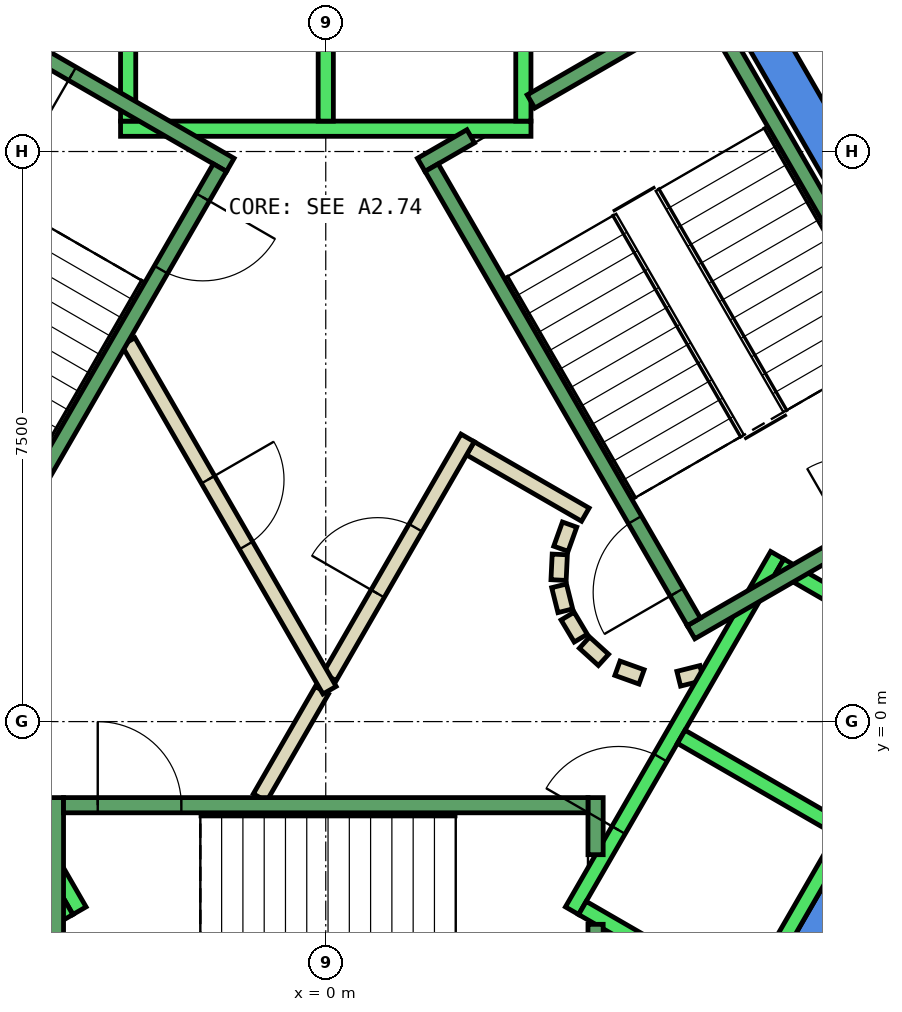
"""IFC4 building model, lengths in metres.
Left out: names, types, materials, properties, quantities, classifications, styles, units other than length and angle.
Written with IfcOpenShell. Run it as: python <this file> out.ifc"""

import sys

from ifc_helpers import new_model, si_unit, direction, frame, frame_2d, origin, place, context, subcontext, project, spatial, polyline, rectangle, outline, extrude, element, fill, save


model = new_model("IFC4")
c1 = context("Model", 3, precision=1e-05, world=origin(), true_north=direction((0.0, 1.0)))
c2 = subcontext(c1, "Body", "Model", "MODEL_VIEW")
j1 = project(units=[si_unit("LENGTHUNIT", "METRE"), si_unit("PLANEANGLEUNIT", "RADIAN")], contexts=[c1])
p1 = place(None, origin())
s1 = spatial("IfcSite", under=j1, at=p1, CompositionType="ELEMENT")
p2 = place(p1, origin())
s2 = spatial("IfcBuilding", under=s1, at=p2, CompositionType="ELEMENT")
p3 = place(p2, frame((0.0, 0.0, 349.4)))
s3 = spatial("IfcBuildingStorey", under=s2, at=p3, CompositionType="ELEMENT", Elevation=349.4)
p4 = place(p3, frame((0.0, 0.0, -0.45)))
e1 = element("IfcWall", 1, at=p4, inside=s3, PredefinedType="SHEAR", context=c2, shape_type="SweptSolid", body=[
    extrude(outline(polyline([(5.486, 9.998), (5.053, 9.748), (9.238, 2.5), (9.815, 2.5), (5.486, 9.998)])), origin(), (0.0, 0.0, 1.0), 4.6),
])
p5 = place(p3, frame((0.0, 0.0, -0.45)))
e2 = element("IfcWall", 2, at=p5, inside=s3, PredefinedType="SHEAR", context=c2, shape_type="SweptSolid", body=[
    extrude(outline(polyline([(4.907, -6.0), (9.815, 2.5), (9.238, 2.5), (4.619, -5.5), (4.907, -6.0)])), origin(), (0.0, 0.0, 1.0), 4.6),
])
p6 = place(p3, frame((-0.866, -1.0, 0.0), z_axis=(0.0, 0.0, 1.0), x_axis=(0.500033287521, 0.866006184372, 0.0)))
e3 = element("IfcWall", 3, at=p6, inside=s3, PredefinedType="PARTITIONING", context=c2, shape_type="SweptSolid", body=[
    extrude(rectangle(XDim=1.632, YDim=0.2, at=frame_2d((0.816, 0.0))), origin(), (0.0, 0.0, 1.0), 4.15),
])
p7 = place(p3, frame((1.903, 3.595, 0.0), z_axis=(0.0, 0.0, 1.0), x_axis=(0.866239139897, -0.499629615326, 0.0)))
e4 = element("IfcWall", 4, at=p7, inside=s3, PredefinedType="PARTITIONING", context=c2, shape_type="SweptSolid", body=[
    extrude(rectangle(XDim=1.745, YDim=0.2, at=frame_2d((0.873, 0.0))), origin(), (0.0, 0.0, 1.0), 4.15),
])
p8 = place(p3, frame((3.208, 2.592, 0.0), z_axis=(0.0, 0.0, 1.0), x_axis=(-0.337388820924, -0.941365382578, 0.0)))
e5 = element("IfcWall", 5, at=p8, inside=s3, PredefinedType="PARTITIONING", context=c2, shape_type="SweptSolid", body=[
    extrude(rectangle(XDim=0.338, YDim=0.2, at=frame_2d((0.169, 0.0))), origin(), (0.0, 0.0, 1.0), 4.15),
])
p9 = place(p3, frame((3.079, 2.199, 0.0), z_axis=(0.0, 0.0, 1.0), x_axis=(-0.047771483479, -0.998858290933, 0.0)))
e6 = element("IfcWall", 6, at=p9, inside=s3, PredefinedType="PARTITIONING", context=c2, shape_type="SweptSolid", body=[
    extrude(rectangle(XDim=0.337, YDim=0.2, at=frame_2d((0.169, 0.0))), origin(), (0.0, 0.0, 1.0), 4.15),
])
p10 = place(p3, frame((3.07, 1.786, 0.0), z_axis=(0.0, 0.0, 1.0), x_axis=(0.242705583207, -0.970099994784, 0.0)))
e7 = element("IfcWall", 7, at=p10, inside=s3, PredefinedType="PARTITIONING", context=c2, shape_type="SweptSolid", body=[
    extrude(rectangle(XDim=0.338, YDim=0.2, at=frame_2d((0.169, 0.0))), origin(), (0.0, 0.0, 1.0), 4.15),
])
for number, where, z_axis, x_axis in (
    (8, (3.182, 1.388, 0.0), (0.0, 0.0, 1.0), (0.512, -0.859, 0.0)),
    (9, (3.404, 1.039, 0.0), (0.0, 0.0, 1.0), (0.74, -0.672, 0.0)),
):
    element("IfcWall", number, at=place(p3, frame(where, z_axis=z_axis, x_axis=x_axis)), inside=s3, PredefinedType="PARTITIONING", context=c2, shape_type="SweptSolid", body=[
        extrude(rectangle(XDim=0.338, YDim=0.2, at=frame_2d((0.169, 0.0))), origin(), (0.0, 0.0, 1.0), 4.15),
    ])
p11 = place(p3, frame((3.838, 0.702, 0.0), z_axis=(0.0, 0.0, 1.0), x_axis=(0.941035081519, -0.338308993895, 0.0)))
e10 = element("IfcWall", 10, at=p11, inside=s3, PredefinedType="PARTITIONING", context=c2, shape_type="SweptSolid", body=[
    extrude(rectangle(XDim=0.337, YDim=0.2, at=frame_2d((0.168, 0.0))), origin(), (0.0, 0.0, 1.0), 4.15),
])
p12 = place(p3, frame((4.644, 0.564, 0.0), z_axis=(0.0, 0.0, 1.0), x_axis=(0.970004408322, 0.243087325534, 0.0)))
e11 = element("IfcWall", 11, at=p12, inside=s3, PredefinedType="PARTITIONING", context=c2, shape_type="SweptSolid", body=[
    extrude(rectangle(XDim=0.312, YDim=0.2, at=frame_2d((0.156, 0.0))), origin(), (0.0, 0.0, 1.0), 4.15),
])
p13 = place(p3, frame((0.05, 0.587, 0.0), z_axis=(0.0, 0.0, 1.0), x_axis=(0.500028932171, 0.866008699143, 0.0)))
e12 = element("IfcWall", 12, at=p13, inside=s3, PredefinedType="PARTITIONING", context=c2, shape_type="SweptSolid", body=[
    extrude(rectangle(XDim=3.632, YDim=0.2, at=frame_2d((1.816, 0.0))), origin(), (0.0, 0.0, 1.0), 4.15),
])
p14 = place(p13, frame((1.266, 0.0, 0.0)))
e13 = element("IfcOpeningElement", 13, at=p14, cuts=e12, PredefinedType="OPENING", context=c2, shape_type="SweptSolid", body=[
    extrude(rectangle(XDim=1.0, YDim=2.1, at=frame_2d((0.5, 1.05))), frame((0.0, 0.11, 0.0), z_axis=(0.0, -1.0, 0.0), x_axis=(1.0, 0.0, 0.0)), (0.0, 0.0, 1.0), 0.22),
])
p15 = place(p3, frame((-2.598, 5.0, 0.0), z_axis=(0.0, 0.0, 1.0), x_axis=(0.49995654735, -0.86605048973, 0.0)))
e14 = element("IfcWall", 14, at=p15, inside=s3, PredefinedType="PARTITIONING", context=c2, shape_type="SweptSolid", body=[
    extrude(rectangle(XDim=5.296, YDim=0.2, at=frame_2d((2.648, 0.0))), origin(), (0.0, 0.0, 1.0), 4.15),
])
p16 = place(p15, frame((2.098, 0.0, 0.0)))
e15 = element("IfcOpeningElement", 15, at=p16, cuts=e14, PredefinedType="OPENING", context=c2, shape_type="SweptSolid", body=[
    extrude(rectangle(XDim=1.0, YDim=2.1, at=frame_2d((0.5, 1.05))), frame((0.0, 0.11, 0.0), z_axis=(0.0, -1.0, 0.0), x_axis=(1.0, 0.0, 0.0)), (0.0, 0.0, 1.0), 0.22),
])
p17 = place(p3, frame((2.7, 7.8, 0.0), z_axis=(0.0, 0.0, 1.0), x_axis=(-1.0, 0.0, 0.0)))
e16 = element("IfcWall", 16, at=p17, inside=s3, PredefinedType="STANDARD", context=c2, shape_type="SweptSolid", body=[
    extrude(rectangle(XDim=5.4, YDim=0.2, at=frame_2d((2.7, 0.0))), origin(), (0.0, 0.0, 1.0), 4.15),
])
for number, where, z_axis, x_axis in (
    (17, (2.6, 7.9, 0.0), (0.0, 0.0, 1.0), (0.0, 1.0, 0.0)),
    (18, (0.0, 7.9, 0.0), (0.0, 0.0, 1.0), (0.0, 1.0, 0.0)),
    (19, (-2.6, 7.9, 0.0), (0.0, 0.0, 1.0), (0.0, 1.0, 0.0)),
):
    element("IfcWall", number, at=place(p3, frame(where, z_axis=z_axis, x_axis=x_axis)), inside=s3, PredefinedType="STANDARD", context=c2, shape_type="SweptSolid", body=[
        extrude(rectangle(XDim=2.4, YDim=0.2, at=frame_2d((1.2, 0.0))), origin(), (0.0, 0.0, 1.0), 4.15),
    ])
p18 = place(p3, frame((-5.94, 2.188, 0.0), z_axis=(0.0, 0.0, 1.0), x_axis=(0.500034260056, -0.866005622828, 0.0)))
e20 = element("IfcWall", 20, at=p18, inside=s3, PredefinedType="STANDARD", context=c2, shape_type="SweptSolid", body=[
    extrude(rectangle(XDim=5.399, YDim=0.2, at=frame_2d((2.7, 0.0))), origin(), (0.0, 0.0, 1.0), 4.15),
])
p19 = place(p18, frame((1.225, 0.0, 0.0)))
e21 = element("IfcOpeningElement", 21, at=p19, cuts=e20, PredefinedType="OPENING", context=c2, shape_type="SweptSolid", body=[
    extrude(rectangle(XDim=1.1, YDim=2.1, at=frame_2d((0.55, 1.05))), frame((0.0, 0.11, 0.0), z_axis=(0.0, -1.0, 0.0), x_axis=(1.0, 0.0, 0.0)), (0.0, 0.0, 1.0), 0.22),
])
p20 = place(p3, frame((-3.377, -2.452, 0.0), z_axis=(0.0, 0.0, 1.0), x_axis=(-0.865955154139, -0.50012165622, 0.0)))
e22 = element("IfcWall", 22, at=p20, inside=s3, PredefinedType="STANDARD", context=c2, shape_type="SweptSolid", body=[
    extrude(rectangle(XDim=2.4, YDim=0.2, at=frame_2d((1.2, 0.0))), origin(), (0.0, 0.0, 1.0), 4.15),
])
p21 = place(p3, frame((3.24, -2.488, 0.0), z_axis=(0.0, 0.0, 1.0), x_axis=(0.500034260056, 0.866005622828, 0.0)))
e23 = element("IfcWall", 23, at=p21, inside=s3, PredefinedType="STANDARD", context=c2, shape_type="SweptSolid", body=[
    extrude(rectangle(XDim=5.399, YDim=0.2, at=frame_2d((2.7, 0.0))), origin(), (0.0, 0.0, 1.0), 4.15),
])
p22 = place(p21, frame((1.225, 0.0, 0.0)))
e24 = element("IfcOpeningElement", 24, at=p22, cuts=e23, PredefinedType="OPENING", context=c2, shape_type="SweptSolid", body=[
    extrude(rectangle(XDim=1.1, YDim=2.1, at=frame_2d((0.55, 1.05))), frame((0.0, 0.11, 0.0), z_axis=(0.0, -1.0, 0.0), x_axis=(1.0, 0.0, 0.0)), (0.0, 0.0, 1.0), 0.22),
])
p23 = place(p3, frame((5.492, -3.788, 0.0), z_axis=(0.0, 0.0, 1.0), x_axis=(0.500034260056, 0.866005622828, 0.0)))
e25 = element("IfcWall", 25, at=p23, inside=s3, PredefinedType="STANDARD", context=c2, shape_type="SweptSolid", body=[
    extrude(rectangle(XDim=5.399, YDim=0.2, at=frame_2d((2.7, 0.0))), origin(), (0.0, 0.0, 1.0), 4.15),
])
p24 = place(p3, frame((3.377, -2.452, 0.0), z_axis=(0.0, 0.0, 1.0), x_axis=(0.865955154139, -0.50012165622, 0.0)))
e26 = element("IfcWall", 26, at=p24, inside=s3, PredefinedType="STANDARD", context=c2, shape_type="SweptSolid", body=[
    extrude(rectangle(XDim=2.4, YDim=0.2, at=frame_2d((1.2, 0.0))), origin(), (0.0, 0.0, 1.0), 4.15),
])
for number, where, z_axis, x_axis in (
    (27, (4.677, -0.2, 0.0), (0.0, 0.0, 1.0), (0.866, -0.5, 0.0)),
    (28, (5.977, 2.052, 0.0), (0.0, 0.0, 1.0), (0.866, -0.5, 0.0)),
):
    element("IfcWall", number, at=place(p3, frame(where, z_axis=z_axis, x_axis=x_axis)), inside=s3, PredefinedType="STANDARD", context=c2, shape_type="SweptSolid", body=[
        extrude(rectangle(XDim=2.399, YDim=0.2, at=frame_2d((1.2, 0.0))), origin(), (0.0, 0.0, 1.0), 4.15),
    ])
p25 = place(p3, frame((-3.55, -1.0, 0.0), z_axis=(0.0, 0.0, 1.0), x_axis=(0.0, -1.0, 0.0)))
e29 = element("IfcWall", 29, at=p25, inside=s3, PredefinedType="STANDARD", context=c2, shape_type="SweptSolid", body=[
    extrude(rectangle(XDim=4.4, YDim=0.2, at=frame_2d((2.2, 0.0))), origin(), (0.0, 0.0, 1.0), 4.15),
])
p26 = place(p25, frame((2.4, 0.0, 0.0)))
e30 = element("IfcOpeningElement", 30, at=p26, cuts=e29, PredefinedType="OPENING", context=c2, shape_type="SweptSolid", body=[
    extrude(rectangle(XDim=1.1, YDim=2.2, at=frame_2d((0.55, 1.1))), frame((0.0, 0.11, 0.0), z_axis=(0.0, -1.0, 0.0), x_axis=(1.0, 0.0, 0.0)), (0.0, 0.0, 1.0), 0.22),
])
p27 = place(p3, frame((3.55, -2.667, 0.0), z_axis=(0.0, 0.0, 1.0), x_axis=(0.0, -1.0, 0.0)))
e31 = element("IfcWall", 31, at=p27, inside=s3, PredefinedType="STANDARD", context=c2, shape_type="SweptSolid", body=[
    extrude(rectangle(XDim=2.733, YDim=0.2, at=frame_2d((1.366, 0.0))), origin(), (0.0, 0.0, 1.0), 4.15),
])
p28 = place(p3, frame((3.55, -1.0, 0.0), z_axis=(0.0, 0.0, 1.0), x_axis=(0.0, -1.0, 0.0)))
e32 = element("IfcWall", 32, at=p28, inside=s3, PredefinedType="STANDARD", context=c2, shape_type="SweptSolid", body=[
    extrude(rectangle(XDim=0.751, YDim=0.2, at=frame_2d((0.375, 0.0))), origin(), (0.0, 0.0, 1.0), 4.15),
])
p29 = place(p3, frame((-3.45, -1.1, 0.0), z_axis=(0.0, 0.0, 1.0), x_axis=(1.0, 0.0, 0.0)))
e33 = element("IfcWall", 33, at=p29, inside=s3, PredefinedType="STANDARD", context=c2, shape_type="SweptSolid", body=[
    extrude(rectangle(XDim=6.9, YDim=0.2, at=frame_2d((3.45, 0.0))), origin(), (0.0, 0.0, 1.0), 4.15),
])
p30 = place(p29, frame((0.45, 0.0, 0.0)))
e34 = element("IfcOpeningElement", 34, at=p30, cuts=e33, PredefinedType="OPENING", context=c2, shape_type="SweptSolid", body=[
    extrude(rectangle(XDim=1.1, YDim=2.2, at=frame_2d((0.55, 1.1))), frame((0.0, 0.11, 0.0), z_axis=(0.0, -1.0, 0.0), x_axis=(1.0, 0.0, 0.0)), (0.0, 0.0, 1.0), 0.22),
])
p31 = place(p3, frame((4.806, 1.176, 0.0), z_axis=(0.0, 0.0, 1.0), x_axis=(0.866059941101, 0.499940174841, 0.0)))
e35 = element("IfcWall", 35, at=p31, inside=s3, PredefinedType="STANDARD", context=c2, shape_type="SweptSolid", body=[
    extrude(rectangle(XDim=4.4, YDim=0.2, at=frame_2d((2.2, 0.0))), origin(), (0.0, 0.0, 1.0), 4.15),
])
p32 = place(p31, frame((2.4, 0.0, 0.0)))
e36 = element("IfcOpeningElement", 36, at=p32, cuts=e35, PredefinedType="OPENING", context=c2, shape_type="SweptSolid", body=[
    extrude(rectangle(XDim=1.1, YDim=2.2, at=frame_2d((0.55, 1.1))), frame((0.0, 0.11, 0.0), z_axis=(0.0, -1.0, 0.0), x_axis=(1.0, 0.0, 0.0)), (0.0, 0.0, 1.0), 0.22),
])
p33 = place(p3, frame((2.7, 8.158, 0.0), z_axis=(0.0, 0.0, 1.0), x_axis=(0.86611865017, 0.499838457731, 0.0)))
e37 = element("IfcWall", 37, at=p33, inside=s3, PredefinedType="STANDARD", context=c2, shape_type="SweptSolid", body=[
    extrude(rectangle(XDim=2.733, YDim=0.2, at=frame_2d((1.366, 0.0))), origin(), (0.0, 0.0, 1.0), 4.15),
])
p34 = place(p3, frame((1.256, 7.324, 0.0), z_axis=(0.0, 0.0, 1.0), x_axis=(0.865915093549, 0.500191014278, 0.0)))
e38 = element("IfcWall", 38, at=p34, inside=s3, PredefinedType="STANDARD", context=c2, shape_type="SweptSolid", body=[
    extrude(rectangle(XDim=0.752, YDim=0.2, at=frame_2d((0.376, 0.0))), origin(), (0.0, 0.0, 1.0), 4.15),
])
p35 = place(p3, frame((4.843, 1.312, 0.0), z_axis=(0.0, 0.0, 1.0), x_axis=(-0.499963383562, 0.866046543262, 0.0)))
e39 = element("IfcWall", 39, at=p35, inside=s3, PredefinedType="STANDARD", context=c2, shape_type="SweptSolid", body=[
    extrude(rectangle(XDim=6.9, YDim=0.2, at=frame_2d((3.45, 0.0))), origin(), (0.0, 0.0, 1.0), 4.15),
])
p36 = place(p35, frame((0.45, 0.0, 0.0)))
e40 = element("IfcOpeningElement", 40, at=p36, cuts=e39, PredefinedType="OPENING", context=c2, shape_type="SweptSolid", body=[
    extrude(rectangle(XDim=1.1, YDim=2.2, at=frame_2d((0.55, 1.1))), frame((0.0, 0.11, 0.0), z_axis=(0.0, -1.0, 0.0), x_axis=(1.0, 0.0, 0.0)), (0.0, 0.0, 1.0), 0.22),
])
p37 = place(p3, frame((8.48, 3.412, 0.0), z_axis=(0.0, 0.0, 1.0), x_axis=(-0.499978703459, 0.866037698999, 0.0)))
e41 = element("IfcWall", 41, at=p37, inside=s3, PredefinedType="STANDARD", context=c2, shape_type="SweptSolid", body=[
    extrude(rectangle(XDim=6.9, YDim=0.2, at=frame_2d((3.45, 0.0))), origin(), (0.0, 0.0, 1.0), 4.15),
])
p38 = place(p3, frame((-1.256, 7.324, 0.0), z_axis=(0.0, 0.0, 1.0), x_axis=(-0.866046073146, 0.499964197906, 0.0)))
e42 = element("IfcWall", 42, at=p38, inside=s3, PredefinedType="STANDARD", context=c2, shape_type="SweptSolid", body=[
    extrude(rectangle(XDim=4.4, YDim=0.2, at=frame_2d((2.2, 0.0))), origin(), (0.0, 0.0, 1.0), 4.15),
])
p39 = place(p38, frame((2.4, 0.0, 0.0)))
e43 = element("IfcOpeningElement", 43, at=p39, cuts=e42, PredefinedType="OPENING", context=c2, shape_type="SweptSolid", body=[
    extrude(rectangle(XDim=1.1, YDim=2.2, at=frame_2d((0.55, 1.1))), frame((0.0, 0.11, 0.0), z_axis=(0.0, -1.0, 0.0), x_axis=(1.0, 0.0, 0.0)), (0.0, 0.0, 1.0), 0.22),
])
p40 = place(p3, frame((-1.393, 7.288, 0.0), z_axis=(0.0, 0.0, 1.0), x_axis=(-0.499963383562, -0.866046543262, 0.0)))
e44 = element("IfcWall", 44, at=p40, inside=s3, PredefinedType="STANDARD", context=c2, shape_type="SweptSolid", body=[
    extrude(rectangle(XDim=6.9, YDim=0.2, at=frame_2d((3.45, 0.0))), origin(), (0.0, 0.0, 1.0), 4.15),
])
p41 = place(p40, frame((0.45, 0.0, 0.0)))
e45 = element("IfcOpeningElement", 45, at=p41, cuts=e44, PredefinedType="OPENING", context=c2, shape_type="SweptSolid", body=[
    extrude(rectangle(XDim=1.1, YDim=2.2, at=frame_2d((0.55, 1.1))), frame((0.0, 0.11, 0.0), z_axis=(0.0, -1.0, 0.0), x_axis=(1.0, 0.0, 0.0)), (0.0, 0.0, 1.0), 0.22),
])
p42 = place(p14, origin())
e46 = element("IfcDoor", 46, at=p42, inside=s3, OperationType="SINGLE_SWING_RIGHT", PredefinedType="DOOR", context=c2, shape_type="SweptSolid", body=[
    extrude(rectangle(XDim=1.0, YDim=2.1, at=frame_2d((0.5, 1.05))), frame((0.0, 0.025, 0.0), z_axis=(0.0, -1.0, 0.0), x_axis=(1.0, 0.0, 0.0)), (0.0, 0.0, 1.0), 0.05),
])
fill(e13, e46)
p43 = place(p16, origin())
e47 = element("IfcDoor", 47, at=p43, inside=s3, OperationType="SINGLE_SWING_RIGHT", PredefinedType="DOOR", context=c2, shape_type="SweptSolid", body=[
    extrude(rectangle(XDim=1.0, YDim=2.1, at=frame_2d((0.5, 1.05))), frame((0.0, 0.025, 0.0), z_axis=(0.0, -1.0, 0.0), x_axis=(1.0, 0.0, 0.0)), (0.0, 0.0, 1.0), 0.05),
])
fill(e15, e47)
p44 = place(p22, origin())
e48 = element("IfcDoor", 48, at=p44, inside=s3, OperationType="SLIDING_TO_LEFT", PredefinedType="DOOR", context=c2, shape_type="SweptSolid", body=[
    extrude(rectangle(XDim=1.1, YDim=2.1, at=frame_2d((0.55, 1.05))), frame((0.0, 0.025, 0.0), z_axis=(0.0, -1.0, 0.0), x_axis=(1.0, 0.0, 0.0)), (0.0, 0.0, 1.0), 0.05),
])
fill(e24, e48)
p45 = place(p30, origin())
e49 = element("IfcDoor", 49, at=p45, inside=s3, OperationType="SINGLE_SWING_LEFT", PredefinedType="DOOR", context=c2, shape_type="SweptSolid", body=[
    extrude(rectangle(XDim=1.1, YDim=2.2, at=frame_2d((0.55, 1.1))), frame((0.0, 0.025, 0.0), z_axis=(0.0, -1.0, 0.0), x_axis=(1.0, 0.0, 0.0)), (0.0, 0.0, 1.0), 0.05),
])
fill(e34, e49)
p46 = place(p36, origin())
e50 = element("IfcDoor", 50, at=p46, inside=s3, OperationType="SINGLE_SWING_LEFT", PredefinedType="DOOR", context=c2, shape_type="SweptSolid", body=[
    extrude(rectangle(XDim=1.1, YDim=2.2, at=frame_2d((0.55, 1.1))), frame((0.0, 0.025, 0.0), z_axis=(0.0, -1.0, 0.0), x_axis=(1.0, 0.0, 0.0)), (0.0, 0.0, 1.0), 0.05),
])
fill(e40, e50)
p47 = place(p41, origin())
e51 = element("IfcDoor", 51, at=p47, inside=s3, OperationType="SINGLE_SWING_LEFT", PredefinedType="DOOR", context=c2, shape_type="SweptSolid", body=[
    extrude(rectangle(XDim=1.1, YDim=2.2, at=frame_2d((0.55, 1.1))), frame((0.0, 0.025, 0.0), z_axis=(0.0, -1.0, 0.0), x_axis=(1.0, 0.0, 0.0)), (0.0, 0.0, 1.0), 0.05),
])
fill(e45, e51)
p48 = place(p39, origin())
e52 = element("IfcDoor", 52, at=p48, inside=s3, OperationType="SINGLE_SWING_LEFT", PredefinedType="DOOR", context=c2, shape_type="SweptSolid", body=[
    extrude(rectangle(XDim=1.1, YDim=2.2, at=frame_2d((0.55, 1.1))), frame((0.0, 0.025, 0.0), z_axis=(0.0, -1.0, 0.0), x_axis=(1.0, 0.0, 0.0)), (0.0, 0.0, 1.0), 0.05),
])
fill(e43, e52)
save(model, sys.argv[1])
